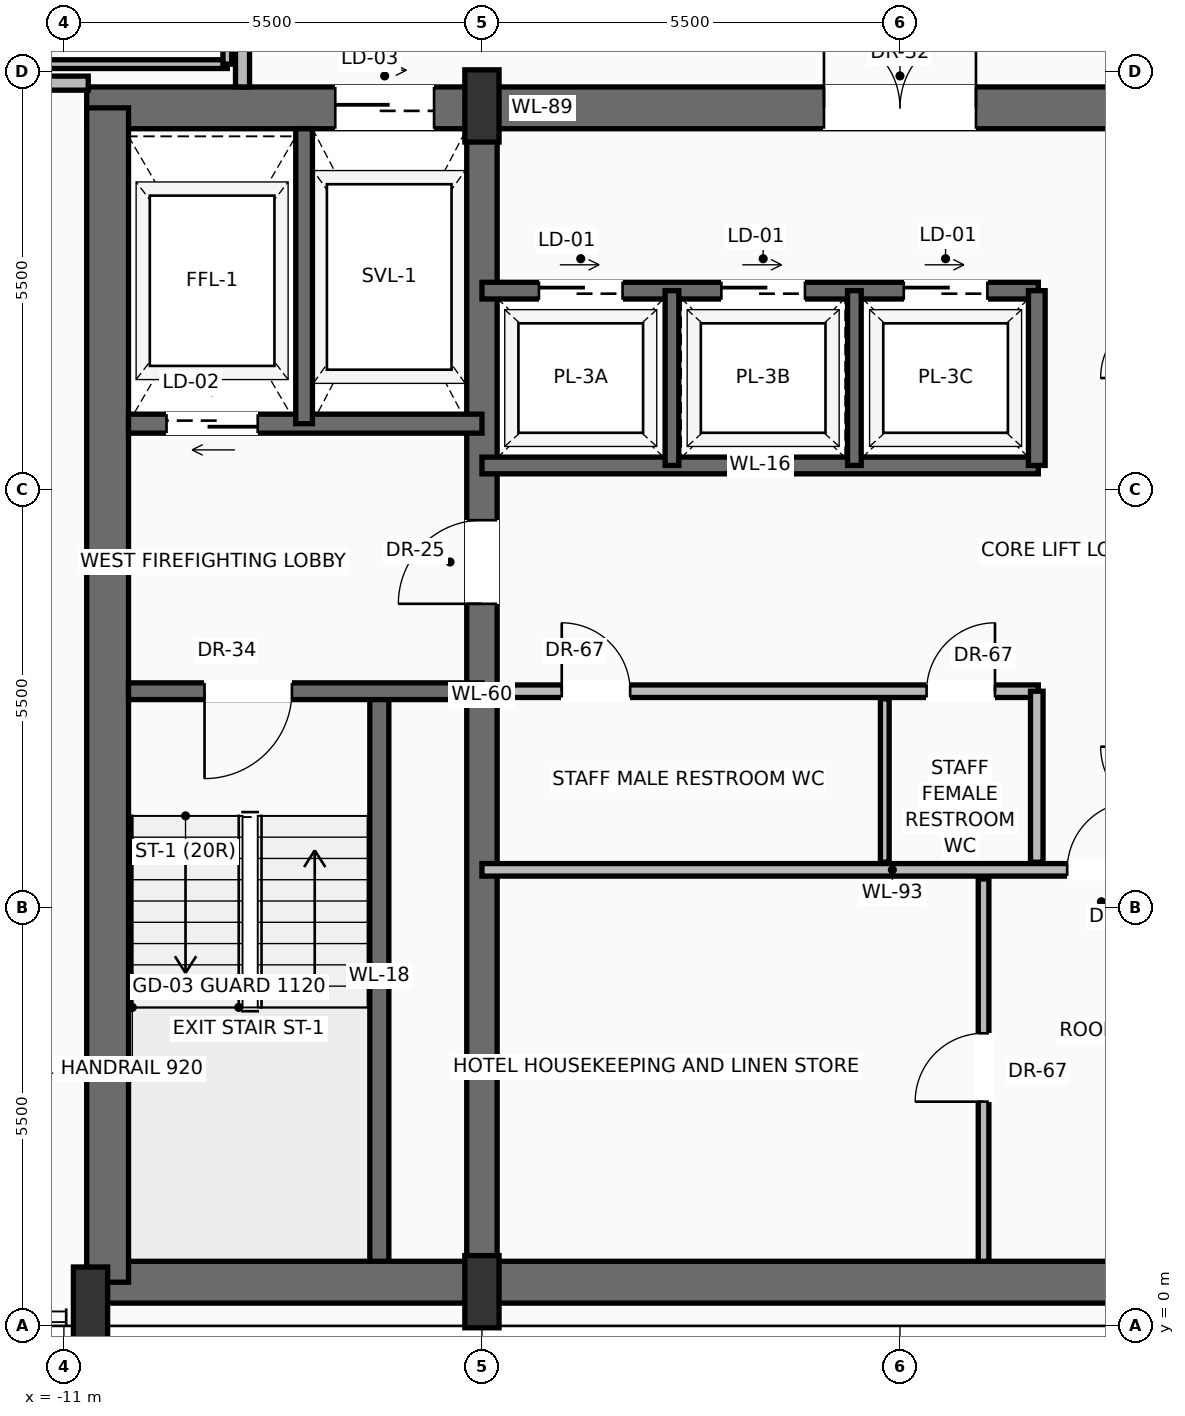
"""IFC4 building model, lengths in metres.
Left out: names, types, materials, properties, quantities, classifications, styles, units other than length and angle.
Written with IfcOpenShell. Run it as: python <this file> out.ifc"""

import sys

from ifc_helpers import new_model, si_unit, direction, frame, frame_2d, origin, origin_2d, place, context, subcontext, project, spatial, rectangle, extrude, source, transform, mapped, element, fill, save


model = new_model("IFC4")
c1 = context("Model", 3, precision=1e-05, world=origin(), true_north=direction((0.0, 1.0)))
c2 = subcontext(c1, "Body", "Model", "MODEL_VIEW")
j1 = project(units=[si_unit("LENGTHUNIT", "METRE"), si_unit("PLANEANGLEUNIT", "RADIAN")], contexts=[c1])
p1 = place(None, origin())
s1 = spatial("IfcSite", under=j1, at=p1, CompositionType="ELEMENT")
p2 = place(p1, origin())
s2 = spatial("IfcBuilding", under=s1, at=p2, CompositionType="ELEMENT")
p3 = place(p2, frame((0.0, 0.0, 237.25)))
s3 = spatial("IfcBuildingStorey", under=s2, at=p3, CompositionType="ELEMENT", Elevation=237.25)
p4 = place(p3, frame((-10.65, 0.575, 0.0), z_axis=(0.0, 0.0, 1.0), x_axis=(1.0, 0.0, 0.0)))
e1 = element("IfcWall", 1, at=p4, inside=s3, PredefinedType="SHEAR", context=c2, shape_type="SweptSolid", body=[
    extrude(rectangle(XDim=21.3, YDim=0.55, at=frame_2d((10.65, 0.0))), origin(), (0.0, 0.0, 1.0), 3.24),
])
p5 = place(p3, frame((-10.7, 16.025, 0.0), z_axis=(0.0, 0.0, 1.0), x_axis=(1.0, 0.0, 0.0)))
e2 = element("IfcWall", 2, at=p5, inside=s3, PredefinedType="SHEAR", context=c2, shape_type="SweptSolid", body=[
    extrude(rectangle(XDim=21.4, YDim=0.55, at=frame_2d((10.7, 0.0))), origin(), (0.0, 0.0, 1.0), 3.24),
])
p6 = place(p5, frame((3.27, 0.0, 0.0)))
e3 = element("IfcOpeningElement", 3, at=p6, cuts=e2, PredefinedType="OPENING", context=c2, shape_type="SweptSolid", body=[
    extrude(rectangle(XDim=1.3, YDim=2.3, at=frame_2d((0.65, 1.15))), frame((0.0, 0.285, 0.0), z_axis=(0.0, -1.0, 0.0), x_axis=(1.0, 0.0, 0.0)), (0.0, 0.0, 1.0), 0.57),
])
p7 = place(p5, frame((9.7, 0.0, 0.0)))
e4 = element("IfcOpeningElement", 4, at=p7, cuts=e2, PredefinedType="OPENING", context=c2, shape_type="SweptSolid", body=[
    extrude(rectangle(XDim=2.0, YDim=2.4, at=frame_2d((1.0, 1.2))), frame((0.0, 0.285, 0.0), z_axis=(0.0, -1.0, 0.0), x_axis=(1.0, 0.0, 0.0)), (0.0, 0.0, 1.0), 0.57),
])
p8 = place(p3, frame((-10.425, 0.575, 0.0), z_axis=(0.0, 0.0, 1.0), x_axis=(0.0, 1.0, 0.0)))
e5 = element("IfcWall", 5, at=p8, inside=s3, PredefinedType="SHEAR", context=c2, shape_type="SweptSolid", body=[
    extrude(rectangle(XDim=15.45, YDim=0.55, at=frame_2d((7.725, 0.0))), origin(), (0.0, 0.0, 1.0), 3.24),
])
p9 = place(p3, frame((-5.5, 0.575, 0.0), z_axis=(0.0, 0.0, 1.0), x_axis=(0.0, 1.0, 0.0)))
e6 = element("IfcWall", 6, at=p9, inside=s3, PredefinedType="SHEAR", context=c2, shape_type="SweptSolid", body=[
    extrude(rectangle(XDim=15.45, YDim=0.4, at=frame_2d((7.725, 0.0))), origin(), (0.0, 0.0, 1.0), 3.24),
])
p10 = place(p9, frame((8.925, 0.0, 0.0)))
e7 = element("IfcOpeningElement", 7, at=p10, cuts=e6, PredefinedType="OPENING", context=c2, shape_type="SweptSolid", body=[
    extrude(rectangle(XDim=1.1, YDim=2.2, at=frame_2d((0.55, 1.1))), frame((0.0, 0.21, 0.0), z_axis=(0.0, -1.0, 0.0), x_axis=(1.0, 0.0, 0.0)), (0.0, 0.0, 1.0), 0.42),
])
m1 = source(origin(), c2, "Body", "SweptSolid", [
    extrude(rectangle(XDim=0.45, YDim=0.95, at=origin_2d()), origin(), (0.0, 0.0, 1.0), 3.45),
])
for number, where, z_axis, x_axis in (
    (8, (-10.65, 0.3, 0.0), (0.0, 0.0, 1.0), (1.0, 0.0, 0.0)),
    (9, (-5.5, 0.45, 0.0), (0.0, 0.0, 1.0), (1.0, 0.0, 0.0)),
    (10, (-5.5, 16.05, 0.0), (0.0, 0.0, 1.0), (1.0, 0.0, 0.0)),
):
    element("IfcColumn", number, at=place(p3, frame(where, z_axis=z_axis, x_axis=x_axis)), inside=s3, PredefinedType="PILASTER", context=c2, shape_type="MappedRepresentation", body=[
        mapped(m1, transform((0.0, 0.0, 0.0), scale=1.0)),
    ])
p11 = place(p3, frame((-19.43, 15.137, 0.0), z_axis=(0.0, 0.0, 1.0), x_axis=(0.508699873742, 0.860943922944, 0.0)))
e11 = element("IfcWall", 11, at=p11, inside=s3, PredefinedType="SOLIDWALL", context=c2, shape_type="SweptSolid", body=[
    extrude(rectangle(XDim=19.559, YDim=0.28, at=frame_2d((9.779, 0.0))), origin(), (0.0, 0.0, 1.0), 2.82),
])
p12 = place(p11, frame((4.694, 0.0, 0.0)))
e12 = element("IfcOpeningElement", 12, at=p12, cuts=e11, PredefinedType="OPENING", context=c2, shape_type="SweptSolid", body=[
    extrude(rectangle(XDim=1.6, YDim=2.35, at=frame_2d((0.8, 1.175))), frame((0.0, 0.15, 0.0), z_axis=(0.0, -1.0, 0.0), x_axis=(1.0, 0.0, 0.0)), (0.0, 0.0, 1.0), 0.3),
])
p13 = place(p11, frame((13.3, 0.0, 0.9)))
e13 = element("IfcOpeningElement", 13, at=p13, cuts=e11, PredefinedType="OPENING", context=c2, shape_type="SweptSolid", body=[
    extrude(rectangle(XDim=1.55, YDim=1.75, at=frame_2d((0.775, 0.875))), frame((0.0, 0.15, 0.0), z_axis=(0.0, -1.0, 0.0), x_axis=(1.0, 0.0, 0.0)), (0.0, 0.0, 1.0), 0.3),
])
p14 = place(p3, frame((-6.85, 0.85, 0.0), z_axis=(0.0, 0.0, 1.0), x_axis=(0.0, 1.0, 0.0)))
e14 = element("IfcWall", 14, at=p14, inside=s3, PredefinedType="SOLIDWALL", context=c2, shape_type="SweptSolid", body=[
    extrude(rectangle(XDim=7.5, YDim=0.25, at=frame_2d((3.75, 0.0))), origin(), (0.0, 0.0, 1.0), 3.24),
])
p15 = place(p3, frame((-5.5, 8.35, 0.0), z_axis=(0.0, 0.0, 1.0), x_axis=(-1.0, 0.0, 0.0)))
e15 = element("IfcWall", 15, at=p15, inside=s3, PredefinedType="SOLIDWALL", context=c2, shape_type="SweptSolid", body=[
    extrude(rectangle(XDim=4.65, YDim=0.22, at=frame_2d((2.325, 0.0))), origin(), (0.0, 0.0, 1.0), 3.24),
])
p16 = place(p15, frame((2.5, 0.0, 0.0)))
e16 = element("IfcOpeningElement", 16, at=p16, cuts=e15, PredefinedType="OPENING", context=c2, shape_type="SweptSolid", body=[
    extrude(rectangle(XDim=1.15, YDim=2.2, at=frame_2d((0.575, 1.1))), frame((0.0, 0.12, 0.0), z_axis=(0.0, -1.0, 0.0), x_axis=(1.0, 0.0, 0.0)), (0.0, 0.0, 1.0), 0.24),
])
p17 = place(p3, frame((-5.5, 11.87, 0.0), z_axis=(0.0, 0.0, 1.0), x_axis=(-1.0, 0.0, 0.0)))
e17 = element("IfcWall", 17, at=p17, inside=s3, PredefinedType="SOLIDWALL", context=c2, shape_type="SweptSolid", body=[
    extrude(rectangle(XDim=4.65, YDim=0.25, at=frame_2d((2.325, 0.0))), origin(), (0.0, 0.0, 1.0), 3.24),
])
p18 = place(p17, frame((2.95, 0.0, 0.0)))
e18 = element("IfcOpeningElement", 18, at=p18, cuts=e17, PredefinedType="OPENING", context=c2, shape_type="SweptSolid", body=[
    extrude(rectangle(XDim=1.2, YDim=2.25, at=frame_2d((0.6, 1.125))), frame((0.0, 0.135, 0.0), z_axis=(0.0, -1.0, 0.0), x_axis=(1.0, 0.0, 0.0)), (0.0, 0.0, 1.0), 0.27),
])
p19 = place(p3, frame((-7.84, 11.87, 0.0), z_axis=(0.0, 0.0, 1.0), x_axis=(0.0, 1.0, 0.0)))
e19 = element("IfcWall", 19, at=p19, inside=s3, PredefinedType="SOLIDWALL", context=c2, shape_type="SweptSolid", body=[
    extrude(rectangle(XDim=3.88, YDim=0.22, at=frame_2d((1.94, 0.0))), origin(), (0.0, 0.0, 1.0), 3.24),
])
p20 = place(p3, frame((-5.5, 6.0, 0.0), z_axis=(0.0, 0.0, 1.0), x_axis=(1.0, 0.0, 0.0)))
e20 = element("IfcWall", 20, at=p20, inside=s3, PredefinedType="PARTITIONING", context=c2, shape_type="SweptSolid", body=[
    extrude(rectangle(XDim=10.8, YDim=0.165, at=frame_2d((5.4, 0.0))), origin(), (0.0, 0.0, 1.0), 3.232),
])
p21 = place(p20, frame((7.7, 0.0, 0.0)))
e21 = element("IfcOpeningElement", 21, at=p21, cuts=e20, PredefinedType="OPENING", context=c2, shape_type="SweptSolid", body=[
    extrude(rectangle(XDim=0.9, YDim=2.1, at=frame_2d((0.45, 1.05))), frame((0.0, 0.093, 0.0), z_axis=(0.0, -1.0, 0.0), x_axis=(1.0, 0.0, 0.0)), (0.0, 0.0, 1.0), 0.185),
])
p22 = place(p3, frame((1.1, 0.85, 0.0), z_axis=(0.0, 0.0, 1.0), x_axis=(0.0, 1.0, 0.0)))
e22 = element("IfcWall", 22, at=p22, inside=s3, PredefinedType="PARTITIONING", context=c2, shape_type="SweptSolid", body=[
    extrude(rectangle(XDim=5.03, YDim=0.14, at=frame_2d((2.515, 0.0))), origin(), (0.0, 0.0, 1.0), 3.232),
])
p23 = place(p22, frame((2.1, 0.0, 0.0)))
e23 = element("IfcOpeningElement", 23, at=p23, cuts=e22, PredefinedType="OPENING", context=c2, shape_type="SweptSolid", body=[
    extrude(rectangle(XDim=0.9, YDim=2.1, at=frame_2d((0.45, 1.05))), frame((0.0, 0.08, 0.0), z_axis=(0.0, -1.0, 0.0), x_axis=(1.0, 0.0, 0.0)), (0.0, 0.0, 1.0), 0.16),
])
p24 = place(p3, frame((-5.3, 8.35, 0.0), z_axis=(0.0, 0.0, 1.0), x_axis=(1.0, 0.0, 0.0)))
e24 = element("IfcWall", 24, at=p24, inside=s3, PredefinedType="PARTITIONING", context=c2, shape_type="SweptSolid", body=[
    extrude(rectangle(XDim=7.12, YDim=0.165, at=frame_2d((3.56, 0.0))), origin(), (0.0, 0.0, 1.0), 3.232),
])
p25 = place(p24, frame((0.85, 0.0, 0.0)))
e25 = element("IfcOpeningElement", 25, at=p25, cuts=e24, PredefinedType="OPENING", context=c2, shape_type="SweptSolid", body=[
    extrude(rectangle(XDim=0.9, YDim=2.1, at=frame_2d((0.45, 1.05))), frame((0.0, 0.093, 0.0), z_axis=(0.0, -1.0, 0.0), x_axis=(1.0, 0.0, 0.0)), (0.0, 0.0, 1.0), 0.185),
])
p26 = place(p24, frame((5.65, 0.0, 0.0)))
e26 = element("IfcOpeningElement", 26, at=p26, cuts=e24, PredefinedType="OPENING", context=c2, shape_type="SweptSolid", body=[
    extrude(rectangle(XDim=0.9, YDim=2.1, at=frame_2d((0.45, 1.05))), frame((0.0, 0.093, 0.0), z_axis=(0.0, -1.0, 0.0), x_axis=(1.0, 0.0, 0.0)), (0.0, 0.0, 1.0), 0.185),
])
p27 = place(p3, frame((1.8, 6.1, 0.0), z_axis=(0.0, 0.0, 1.0), x_axis=(0.0, 1.0, 0.0)))
e27 = element("IfcWall", 27, at=p27, inside=s3, PredefinedType="PARTITIONING", context=c2, shape_type="SweptSolid", body=[
    extrude(rectangle(XDim=2.25, YDim=0.165, at=frame_2d((1.125, 0.0))), origin(), (0.0, 0.0, 1.0), 3.232),
])
p28 = place(p3, frame((-0.2, 6.1, 0.0), z_axis=(0.0, 0.0, 1.0), x_axis=(0.0, 1.0, 0.0)))
e28 = element("IfcWall", 28, at=p28, inside=s3, PredefinedType="PARTITIONING", context=c2, shape_type="SweptSolid", body=[
    extrude(rectangle(XDim=2.15, YDim=0.115, at=frame_2d((1.075, 0.0))), origin(), (0.0, 0.0, 1.0), 3.232),
])
p29 = place(p3, frame((-5.5, 11.32, 0.0), z_axis=(0.0, 0.0, 1.0), x_axis=(1.0, 0.0, 0.0)))
e29 = element("IfcWall", 29, at=p29, inside=s3, PredefinedType="SOLIDWALL", context=c2, shape_type="SweptSolid", body=[
    extrude(rectangle(XDim=7.32, YDim=0.22, at=frame_2d((3.66, 0.0))), origin(), (0.0, 0.0, 1.0), 3.24),
])
p30 = place(p3, frame((-5.5, 13.62, 0.0), z_axis=(0.0, 0.0, 1.0), x_axis=(1.0, 0.0, 0.0)))
e30 = element("IfcWall", 30, at=p30, inside=s3, PredefinedType="SOLIDWALL", context=c2, shape_type="SweptSolid", body=[
    extrude(rectangle(XDim=7.32, YDim=0.22, at=frame_2d((3.66, 0.0))), origin(), (0.0, 0.0, 1.0), 3.24),
])
p31 = place(p30, frame((0.75, 0.0, 0.0)))
e31 = element("IfcOpeningElement", 31, at=p31, cuts=e30, PredefinedType="OPENING", context=c2, shape_type="SweptSolid", body=[
    extrude(rectangle(XDim=1.1, YDim=2.2, at=frame_2d((0.55, 1.1))), frame((0.0, 0.12, 0.0), z_axis=(0.0, -1.0, 0.0), x_axis=(1.0, 0.0, 0.0)), (0.0, 0.0, 1.0), 0.24),
])
p32 = place(p30, frame((3.15, 0.0, 0.0)))
e32 = element("IfcOpeningElement", 32, at=p32, cuts=e30, PredefinedType="OPENING", context=c2, shape_type="SweptSolid", body=[
    extrude(rectangle(XDim=1.1, YDim=2.2, at=frame_2d((0.55, 1.1))), frame((0.0, 0.12, 0.0), z_axis=(0.0, -1.0, 0.0), x_axis=(1.0, 0.0, 0.0)), (0.0, 0.0, 1.0), 0.24),
])
p33 = place(p30, frame((5.55, 0.0, 0.0)))
e33 = element("IfcOpeningElement", 33, at=p33, cuts=e30, PredefinedType="OPENING", context=c2, shape_type="SweptSolid", body=[
    extrude(rectangle(XDim=1.1, YDim=2.2, at=frame_2d((0.55, 1.1))), frame((0.0, 0.12, 0.0), z_axis=(0.0, -1.0, 0.0), x_axis=(1.0, 0.0, 0.0)), (0.0, 0.0, 1.0), 0.24),
])
p34 = place(p3, frame((1.8, 11.32, 0.0), z_axis=(0.0, 0.0, 1.0), x_axis=(0.0, 1.0, 0.0)))
e34 = element("IfcWall", 34, at=p34, inside=s3, PredefinedType="SOLIDWALL", context=c2, shape_type="SweptSolid", body=[
    extrude(rectangle(XDim=2.3, YDim=0.22, at=frame_2d((1.15, 0.0))), origin(), (0.0, 0.0, 1.0), 3.24),
])
for number, where, z_axis, x_axis in (
    (35, (-3.0, 11.32, 0.0), (0.0, 0.0, 1.0), (0.0, 1.0, 0.0)),
    (36, (-0.6, 11.32, 0.0), (0.0, 0.0, 1.0), (0.0, 1.0, 0.0)),
):
    element("IfcWall", number, at=place(p3, frame(where, z_axis=z_axis, x_axis=x_axis)), inside=s3, PredefinedType="SOLIDWALL", context=c2, shape_type="SweptSolid", body=[
        extrude(rectangle(XDim=2.3, YDim=0.18, at=frame_2d((1.15, 0.0))), origin(), (0.0, 0.0, 1.0), 3.24),
    ])
p35 = place(p3, frame((-8.65, 16.3, 0.0), z_axis=(0.0, 0.0, 1.0), x_axis=(0.0, 1.0, 0.0)))
e37 = element("IfcWall", 37, at=p35, inside=s3, PredefinedType="PARTITIONING", context=c2, shape_type="SweptSolid", body=[
    extrude(rectangle(XDim=10.5, YDim=0.185, at=frame_2d((5.25, 0.0))), origin(), (0.0, 0.0, 1.0), 3.232),
])
p36 = place(p35, frame((2.854, 0.0, 0.0)))
e38 = element("IfcOpeningElement", 38, at=p36, cuts=e37, PredefinedType="OPENING", context=c2, shape_type="SweptSolid", body=[
    extrude(rectangle(XDim=1.05, YDim=2.25, at=frame_2d((0.525, 1.125))), frame((0.0, 0.103, 0.0), z_axis=(0.0, -1.0, 0.0), x_axis=(1.0, 0.0, 0.0)), (0.0, 0.0, 1.0), 0.205),
])
p37 = place(p35, frame((5.752, 0.0, 0.0)))
e39 = element("IfcOpeningElement", 39, at=p37, cuts=e37, PredefinedType="OPENING", context=c2, shape_type="SweptSolid", body=[
    extrude(rectangle(XDim=1.05, YDim=2.25, at=frame_2d((0.525, 1.125))), frame((0.0, 0.103, 0.0), z_axis=(0.0, -1.0, 0.0), x_axis=(1.0, 0.0, 0.0)), (0.0, 0.0, 1.0), 0.205),
])
p38 = place(p35, frame((8.457, 0.0, 0.0)))
e40 = element("IfcOpeningElement", 40, at=p38, cuts=e37, PredefinedType="OPENING", context=c2, shape_type="SweptSolid", body=[
    extrude(rectangle(XDim=1.05, YDim=2.25, at=frame_2d((0.525, 1.125))), frame((0.0, 0.103, 0.0), z_axis=(0.0, -1.0, 0.0), x_axis=(1.0, 0.0, 0.0)), (0.0, 0.0, 1.0), 0.205),
])
p39 = place(p3, frame((-18.865, 16.35, 0.0), z_axis=(0.0, 0.0, 1.0), x_axis=(1.0, 0.0, 0.0)))
e41 = element("IfcWall", 41, at=p39, inside=s3, PredefinedType="PARTITIONING", context=c2, shape_type="SweptSolid", body=[
    extrude(rectangle(XDim=8.185, YDim=0.185, at=frame_2d((4.092, 0.0))), origin(), (0.0, 0.0, 1.0), 3.232),
])
p40 = place(p39, frame((4.693, 0.0, 0.0)))
e42 = element("IfcOpeningElement", 42, at=p40, cuts=e41, PredefinedType="OPENING", context=c2, shape_type="SweptSolid", body=[
    extrude(rectangle(XDim=1.05, YDim=2.25, at=frame_2d((0.525, 1.125))), frame((0.0, 0.103, 0.0), z_axis=(0.0, -1.0, 0.0), x_axis=(1.0, 0.0, 0.0)), (0.0, 0.0, 1.0), 0.205),
])
p41 = place(p3, frame((-11.5, 16.6, 0.0), z_axis=(0.0, 0.0, 1.0), x_axis=(1.0, 0.0, 0.0)))
e43 = element("IfcWall", 43, at=p41, inside=s3, PredefinedType="PARTITIONING", context=c2, shape_type="SweptSolid", body=[
    extrude(rectangle(XDim=2.65, YDim=0.115, at=frame_2d((1.325, 0.0))), origin(), (0.0, 0.0, 1.0), 3.232),
])
p42 = place(p3, frame((-8.85, 16.6, 0.0), z_axis=(0.0, 0.0, 1.0), x_axis=(0.0, 1.0, 0.0)))
e44 = element("IfcWall", 44, at=p42, inside=s3, PredefinedType="PARTITIONING", context=c2, shape_type="SweptSolid", body=[
    extrude(rectangle(XDim=2.4, YDim=0.115, at=frame_2d((1.2, 0.0))), origin(), (0.0, 0.0, 1.0), 3.232),
])
m2 = source(origin(), c2, "Body", "SweptSolid", [
    extrude(rectangle(XDim=1.15, YDim=2.2, at=frame_2d((0.575, 1.1))), frame((0.0, 0.025, 0.0), z_axis=(0.0, -1.0, 0.0), x_axis=(1.0, 0.0, 0.0)), (0.0, 0.0, 1.0), 0.05),
])
p43 = place(p16, origin())
e45 = element("IfcDoor", 45, at=p43, inside=s3, OperationType="SINGLE_SWING_RIGHT", PredefinedType="DOOR", context=c2, shape_type="MappedRepresentation", body=[
    mapped(m2, transform((0.0, 0.0, 0.0), scale=1.0)),
])
fill(e16, e45)
m3 = source(origin(), c2, "Body", "SweptSolid", [
    extrude(rectangle(XDim=1.1, YDim=2.2, at=frame_2d((0.55, 1.1))), frame((0.0, 0.025, 0.0), z_axis=(0.0, -1.0, 0.0), x_axis=(1.0, 0.0, 0.0)), (0.0, 0.0, 1.0), 0.05),
])
p44 = place(p10, origin())
e46 = element("IfcDoor", 46, at=p44, inside=s3, OperationType="SINGLE_SWING_LEFT", PredefinedType="DOOR", context=c2, shape_type="MappedRepresentation", body=[
    mapped(m3, transform((0.0, 0.0, 0.0), scale=1.0)),
])
fill(e7, e46)
m4 = source(origin(), c2, "Body", "SweptSolid", [
    extrude(rectangle(XDim=1.2, YDim=2.25, at=frame_2d((0.6, 1.125))), frame((0.0, 0.025, 0.0), z_axis=(0.0, -1.0, 0.0), x_axis=(1.0, 0.0, 0.0)), (0.0, 0.0, 1.0), 0.05),
])
p45 = place(p18, origin())
e47 = element("IfcDoor", 47, at=p45, inside=s3, OperationType="SLIDING_TO_LEFT", PredefinedType="DOOR", context=c2, shape_type="MappedRepresentation", body=[
    mapped(m4, transform((0.0, 0.0, 0.0), scale=1.0)),
])
fill(e18, e47)
m5 = source(origin(), c2, "Body", "SweptSolid", [
    extrude(rectangle(XDim=1.3, YDim=2.3, at=frame_2d((0.65, 1.15))), frame((0.0, 0.025, 0.0), z_axis=(0.0, -1.0, 0.0), x_axis=(1.0, 0.0, 0.0)), (0.0, 0.0, 1.0), 0.05),
])
p46 = place(p6, origin())
e48 = element("IfcDoor", 48, at=p46, inside=s3, OperationType="SLIDING_TO_RIGHT", PredefinedType="DOOR", context=c2, shape_type="MappedRepresentation", body=[
    mapped(m5, transform((0.0, 0.0, 0.0), scale=1.0)),
])
fill(e3, e48)
m6 = source(origin(), c2, "Body", "SweptSolid", [
    extrude(rectangle(XDim=2.0, YDim=2.4, at=frame_2d((1.0, 1.2))), frame((0.0, 0.025, 0.0), z_axis=(0.0, -1.0, 0.0), x_axis=(1.0, 0.0, 0.0)), (0.0, 0.0, 1.0), 0.05),
])
p47 = place(p7, origin())
e49 = element("IfcDoor", 49, at=p47, inside=s3, OperationType="DOUBLE_DOOR_SINGLE_SWING", PredefinedType="DOOR", context=c2, shape_type="MappedRepresentation", body=[
    mapped(m6, transform((0.0, 0.0, 0.0), scale=1.0)),
])
fill(e4, e49)
m7 = source(origin(), c2, "Body", "SweptSolid", [
    extrude(rectangle(XDim=0.9, YDim=2.1, at=frame_2d((0.45, 1.05))), frame((0.0, 0.025, 0.0), z_axis=(0.0, -1.0, 0.0), x_axis=(1.0, 0.0, 0.0)), (0.0, 0.0, 1.0), 0.05),
])
p48 = place(p21, origin())
e50 = element("IfcDoor", 50, at=p48, inside=s3, OperationType="SINGLE_SWING_RIGHT", PredefinedType="DOOR", context=c2, shape_type="MappedRepresentation", body=[
    mapped(m7, transform((0.0, 0.0, 0.0), scale=1.0)),
])
fill(e21, e50)
p49 = place(p23, origin())
e51 = element("IfcDoor", 51, at=p49, inside=s3, OperationType="SINGLE_SWING_LEFT", PredefinedType="DOOR", context=c2, shape_type="MappedRepresentation", body=[
    mapped(m7, transform((0.0, 0.0, 0.0), scale=1.0)),
])
fill(e23, e51)
p50 = place(p25, origin())
e52 = element("IfcDoor", 52, at=p50, inside=s3, OperationType="SINGLE_SWING_LEFT", PredefinedType="DOOR", context=c2, shape_type="MappedRepresentation", body=[
    mapped(m7, transform((0.0, 0.0, 0.0), scale=1.0)),
])
fill(e25, e52)
p51 = place(p26, origin())
e53 = element("IfcDoor", 53, at=p51, inside=s3, OperationType="SINGLE_SWING_RIGHT", PredefinedType="DOOR", context=c2, shape_type="MappedRepresentation", body=[
    mapped(m7, transform((0.0, 0.0, 0.0), scale=1.0)),
])
fill(e26, e53)
m8 = source(origin(), c2, "Body", "SweptSolid", [
    extrude(rectangle(XDim=1.1, YDim=2.2, at=frame_2d((0.55, 1.1))), frame((0.0, 0.025, 0.0), z_axis=(0.0, -1.0, 0.0), x_axis=(1.0, 0.0, 0.0)), (0.0, 0.0, 1.0), 0.05),
])
p52 = place(p31, origin())
e54 = element("IfcDoor", 54, at=p52, inside=s3, OperationType="SLIDING_TO_RIGHT", PredefinedType="DOOR", context=c2, shape_type="MappedRepresentation", body=[
    mapped(m8, transform((0.0, 0.0, 0.0), scale=1.0)),
])
fill(e31, e54)
p53 = place(p32, origin())
e55 = element("IfcDoor", 55, at=p53, inside=s3, OperationType="SLIDING_TO_RIGHT", PredefinedType="DOOR", context=c2, shape_type="MappedRepresentation", body=[
    mapped(m8, transform((0.0, 0.0, 0.0), scale=1.0)),
])
fill(e32, e55)
p54 = place(p33, origin())
e56 = element("IfcDoor", 56, at=p54, inside=s3, OperationType="SLIDING_TO_RIGHT", PredefinedType="DOOR", context=c2, shape_type="MappedRepresentation", body=[
    mapped(m8, transform((0.0, 0.0, 0.0), scale=1.0)),
])
fill(e33, e56)
save(model, sys.argv[1])
